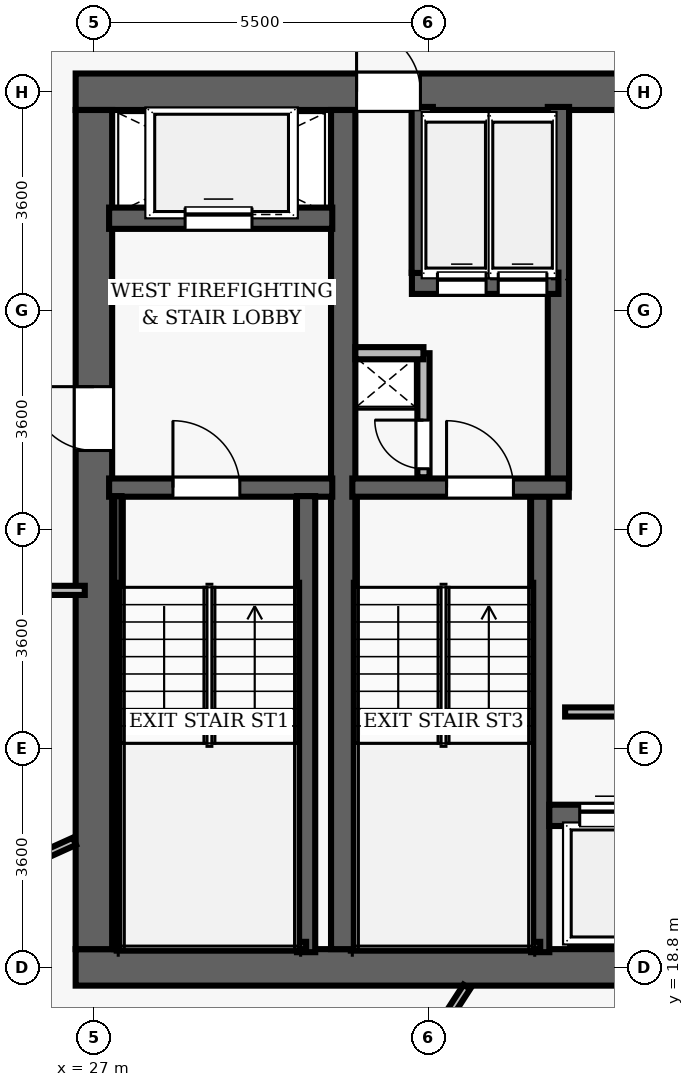
"""IFC4 building model, lengths in metres.
Left out: names, types, materials, properties, quantities, classifications, styles, units other than length and angle.
Written with IfcOpenShell. Run it as: python <this file> out.ifc"""

import sys

from ifc_helpers import new_model, si_unit, direction, frame, frame_2d, origin, place, context, subcontext, project, spatial, rectangle, extrude, element, fill, save


model = new_model("IFC4")
c1 = context("Model", 3, precision=1e-05, world=origin(), true_north=direction((0.0, 1.0)))
c2 = subcontext(c1, "Body", "Model", "MODEL_VIEW")
j1 = project(units=[si_unit("LENGTHUNIT", "METRE"), si_unit("PLANEANGLEUNIT", "RADIAN")], contexts=[c1])
p1 = place(None, origin())
s1 = spatial("IfcSite", under=j1, at=p1, CompositionType="ELEMENT")
p2 = place(p1, origin())
s2 = spatial("IfcBuilding", under=s1, at=p2, CompositionType="ELEMENT")
p3 = place(p2, frame((0.0, 0.0, 137.8)))
s3 = spatial("IfcBuildingStorey", under=s2, at=p3, CompositionType="ELEMENT", Elevation=137.8)
p4 = place(p3, frame((26.7, 18.8, 0.0), z_axis=(0.0, 0.0, 1.0), x_axis=(1.0, 0.0, 0.0)))
e1 = element("IfcWall", 1, at=p4, inside=s3, PredefinedType="SHEAR", context=c2, shape_type="SweptSolid", body=[
    extrude(rectangle(XDim=22.6, YDim=0.6, at=frame_2d((11.3, 0.0))), origin(), (0.0, 0.0, 1.0), 3.5),
])
p5 = place(p4, frame((14.52, 0.0, 0.0)))
e2 = element("IfcOpeningElement", 2, at=p5, cuts=e1, PredefinedType="OPENING", context=c2, shape_type="SweptSolid", body=[
    extrude(rectangle(XDim=1.05, YDim=2.15, at=frame_2d((0.525, 1.075))), frame((0.0, 0.31, 0.0), z_axis=(0.0, -1.0, 0.0), x_axis=(1.0, 0.0, 0.0)), (0.0, 0.0, 1.0), 0.62),
])
p6 = place(p3, frame((26.7, 33.2, 0.0), z_axis=(0.0, 0.0, 1.0), x_axis=(1.0, 0.0, 0.0)))
e3 = element("IfcWall", 3, at=p6, inside=s3, PredefinedType="SHEAR", context=c2, shape_type="SweptSolid", body=[
    extrude(rectangle(XDim=22.6, YDim=0.6, at=frame_2d((11.3, 0.0))), origin(), (0.0, 0.0, 1.0), 3.5),
])
p7 = place(p6, frame((4.62, 0.0, 0.0)))
e4 = element("IfcOpeningElement", 4, at=p7, cuts=e3, PredefinedType="OPENING", context=c2, shape_type="SweptSolid", body=[
    extrude(rectangle(XDim=1.05, YDim=2.15, at=frame_2d((0.525, 1.075))), frame((0.0, 0.31, 0.0), z_axis=(0.0, -1.0, 0.0), x_axis=(1.0, 0.0, 0.0)), (0.0, 0.0, 1.0), 0.62),
])
p8 = place(p6, frame((14.52, 0.0, 0.0)))
e5 = element("IfcOpeningElement", 5, at=p8, cuts=e3, PredefinedType="OPENING", context=c2, shape_type="SweptSolid", body=[
    extrude(rectangle(XDim=1.05, YDim=2.15, at=frame_2d((0.525, 1.075))), frame((0.0, 0.31, 0.0), z_axis=(0.0, -1.0, 0.0), x_axis=(1.0, 0.0, 0.0)), (0.0, 0.0, 1.0), 0.62),
])
p9 = place(p3, frame((27.0, 19.1, 0.0), z_axis=(0.0, 0.0, 1.0), x_axis=(0.0, 1.0, 0.0)))
e6 = element("IfcWall", 6, at=p9, inside=s3, PredefinedType="SHEAR", context=c2, shape_type="SweptSolid", body=[
    extrude(rectangle(XDim=13.8, YDim=0.6, at=frame_2d((6.9, 0.0))), origin(), (0.0, 0.0, 1.0), 3.5),
])
p10 = place(p9, frame((8.2, 0.0, 0.0)))
e7 = element("IfcOpeningElement", 7, at=p10, cuts=e6, PredefinedType="OPENING", context=c2, shape_type="SweptSolid", body=[
    extrude(rectangle(XDim=1.05, YDim=2.15, at=frame_2d((0.525, 1.075))), frame((0.0, 0.31, 0.0), z_axis=(0.0, -1.0, 0.0), x_axis=(1.0, 0.0, 0.0)), (0.0, 0.0, 1.0), 0.62),
])
p11 = place(p3, frame((31.1, 19.1, 0.0), z_axis=(0.0, 0.0, 1.0), x_axis=(0.0, 1.0, 0.0)))
e8 = element("IfcWall", 8, at=p11, inside=s3, PredefinedType="SHEAR", context=c2, shape_type="SweptSolid", body=[
    extrude(rectangle(XDim=13.8, YDim=0.4, at=frame_2d((6.9, 0.0))), origin(), (0.0, 0.0, 1.0), 3.5),
])
p12 = place(p3, frame((27.25, 26.69, 0.0), z_axis=(0.0, 0.0, 1.0), x_axis=(1.0, 0.0, 0.0)))
e9 = element("IfcWall", 9, at=p12, inside=s3, PredefinedType="SHEAR", context=c2, shape_type="SweptSolid", body=[
    extrude(rectangle(XDim=3.67, YDim=0.3, at=frame_2d((1.835, 0.0))), origin(), (0.0, 0.0, 1.0), 3.5),
])
p13 = place(p12, frame((1.05, 0.0, 0.0)))
e10 = element("IfcOpeningElement", 10, at=p13, cuts=e9, PredefinedType="OPENING", context=c2, shape_type="SweptSolid", body=[
    extrude(rectangle(XDim=1.1, YDim=2.15, at=frame_2d((0.55, 1.075))), frame((0.0, 0.16, 0.0), z_axis=(0.0, -1.0, 0.0), x_axis=(1.0, 0.0, 0.0)), (0.0, 0.0, 1.0), 0.32),
])
p14 = place(p3, frame((30.49, 19.05, 0.0), z_axis=(0.0, 0.0, 1.0), x_axis=(0.0, 1.0, 0.0)))
e11 = element("IfcWall", 11, at=p14, inside=s3, PredefinedType="SHEAR", context=c2, shape_type="SweptSolid", body=[
    extrude(rectangle(XDim=7.5, YDim=0.3, at=frame_2d((3.75, 0.0))), origin(), (0.0, 0.0, 1.0), 3.5),
])
p15 = place(p3, frame((27.395, 19.1, 0.0), z_axis=(0.0, 0.0, 1.0), x_axis=(0.0, 1.0, 0.0)))
e12 = element("IfcWall", 12, at=p15, inside=s3, PredefinedType="SHEAR", context=c2, shape_type="SweptSolid", body=[
    extrude(rectangle(XDim=7.45, YDim=0.12, at=frame_2d((3.725, 0.0))), origin(), (0.0, 0.0, 1.0), 3.5),
])
p16 = place(p3, frame((27.395, 19.16, 0.0), z_axis=(0.0, 0.0, 1.0), x_axis=(1.0, 0.0, 0.0)))
e13 = element("IfcWall", 13, at=p16, inside=s3, PredefinedType="SHEAR", context=c2, shape_type="SweptSolid", body=[
    extrude(rectangle(XDim=3.095, YDim=0.12, at=frame_2d((1.547, 0.0))), origin(), (0.0, 0.0, 1.0), 3.5),
])
p17 = place(p3, frame((27.25, 31.12, 0.0), z_axis=(0.0, 0.0, 1.0), x_axis=(1.0, 0.0, 0.0)))
e14 = element("IfcWall", 14, at=p17, inside=s3, PredefinedType="SHEAR", context=c2, shape_type="SweptSolid", body=[
    extrude(rectangle(XDim=3.67, YDim=0.35, at=frame_2d((1.835, 0.0))), origin(), (0.0, 0.0, 1.0), 2.675),
])
p18 = place(p17, frame((1.25, 0.0, 0.0)))
e15 = element("IfcOpeningElement", 15, at=p18, cuts=e14, PredefinedType="OPENING", context=c2, shape_type="SweptSolid", body=[
    extrude(rectangle(XDim=1.1, YDim=2.15, at=frame_2d((0.55, 1.075))), frame((0.0, 0.185, 0.0), z_axis=(0.0, -1.0, 0.0), x_axis=(1.0, 0.0, 0.0)), (0.0, 0.0, 1.0), 0.37),
])
p19 = place(p3, frame((34.34, 19.05, 0.0), z_axis=(0.0, 0.0, 1.0), x_axis=(0.0, 1.0, 0.0)))
e16 = element("IfcWall", 16, at=p19, inside=s3, PredefinedType="SHEAR", context=c2, shape_type="SweptSolid", body=[
    extrude(rectangle(XDim=7.5, YDim=0.3, at=frame_2d((3.75, 0.0))), origin(), (0.0, 0.0, 1.0), 3.5),
])
p20 = place(p3, frame((34.64, 26.69, 0.0), z_axis=(0.0, 0.0, 1.0), x_axis=(0.0, 1.0, 0.0)))
e17 = element("IfcWall", 17, at=p20, inside=s3, PredefinedType="SHEAR", context=c2, shape_type="SweptSolid", body=[
    extrude(rectangle(XDim=6.26, YDim=0.35, at=frame_2d((3.13, 0.0))), origin(), (0.0, 0.0, 1.0), 3.5),
])
p21 = place(p3, frame((31.25, 26.69, 0.0), z_axis=(0.0, 0.0, 1.0), x_axis=(1.0, 0.0, 0.0)))
e18 = element("IfcWall", 18, at=p21, inside=s3, PredefinedType="SHEAR", context=c2, shape_type="SweptSolid", body=[
    extrude(rectangle(XDim=3.56, YDim=0.3, at=frame_2d((1.78, 0.0))), origin(), (0.0, 0.0, 1.0), 3.5),
])
p22 = place(p21, frame((1.55, 0.0, 0.0)))
e19 = element("IfcOpeningElement", 19, at=p22, cuts=e18, PredefinedType="OPENING", context=c2, shape_type="SweptSolid", body=[
    extrude(rectangle(XDim=1.1, YDim=2.15, at=frame_2d((0.55, 1.075))), frame((0.0, 0.16, 0.0), z_axis=(0.0, -1.0, 0.0), x_axis=(1.0, 0.0, 0.0)), (0.0, 0.0, 1.0), 0.32),
])
p23 = place(p3, frame((31.3, 19.16, 0.0), z_axis=(0.0, 0.0, 1.0), x_axis=(1.0, 0.0, 0.0)))
e20 = element("IfcWall", 20, at=p23, inside=s3, PredefinedType="SHEAR", context=c2, shape_type="SweptSolid", body=[
    extrude(rectangle(XDim=3.04, YDim=0.12, at=frame_2d((1.52, 0.0))), origin(), (0.0, 0.0, 1.0), 3.5),
])
p24 = place(p3, frame((32.23, 30.05, 0.0), z_axis=(0.0, 0.0, 1.0), x_axis=(1.0, 0.0, 0.0)))
e21 = element("IfcWall", 21, at=p24, inside=s3, PredefinedType="SHEAR", context=c2, shape_type="SweptSolid", body=[
    extrude(rectangle(XDim=2.41, YDim=0.35, at=frame_2d((1.205, 0.0))), origin(), (0.0, 0.0, 1.0), 2.675),
])
p25 = place(p24, frame((0.42, 0.0, 0.0)))
e22 = element("IfcOpeningElement", 22, at=p25, cuts=e21, PredefinedType="OPENING", context=c2, shape_type="SweptSolid", body=[
    extrude(rectangle(XDim=0.8, YDim=2.15, at=frame_2d((0.4, 1.075))), frame((0.0, 0.185, 0.0), z_axis=(0.0, -1.0, 0.0), x_axis=(1.0, 0.0, 0.0)), (0.0, 0.0, 1.0), 0.37),
])
p26 = place(p24, frame((1.42, 0.0, 0.0)))
e23 = element("IfcOpeningElement", 23, at=p26, cuts=e21, PredefinedType="OPENING", context=c2, shape_type="SweptSolid", body=[
    extrude(rectangle(XDim=0.8, YDim=2.15, at=frame_2d((0.4, 1.075))), frame((0.0, 0.185, 0.0), z_axis=(0.0, -1.0, 0.0), x_axis=(1.0, 0.0, 0.0)), (0.0, 0.0, 1.0), 0.37),
])
p27 = place(p3, frame((32.4, 30.22, 0.0), z_axis=(0.0, 0.0, 1.0), x_axis=(0.0, 1.0, 0.0)))
e24 = element("IfcWall", 24, at=p27, inside=s3, PredefinedType="SHEAR", context=c2, shape_type="SweptSolid", body=[
    extrude(rectangle(XDim=2.73, YDim=0.35, at=frame_2d((1.365, 0.0))), origin(), (0.0, 0.0, 1.0), 2.675),
])
p28 = place(p3, frame((32.42, 26.86, 0.0), z_axis=(0.0, 0.0, 1.0), x_axis=(0.0, 1.0, 0.0)))
e25 = element("IfcWall", 25, at=p28, inside=s3, PredefinedType="PARTITIONING", context=c2, shape_type="SweptSolid", body=[
    extrude(rectangle(XDim=2.04, YDim=0.2, at=frame_2d((1.02, 0.0))), origin(), (0.0, 0.0, 1.0), 2.675),
])
p29 = place(p28, frame((0.14, 0.0, 0.0)))
e26 = element("IfcOpeningElement", 26, at=p29, cuts=e25, PredefinedType="OPENING", context=c2, shape_type="SweptSolid", body=[
    extrude(rectangle(XDim=0.8, YDim=2.05, at=frame_2d((0.4, 1.025))), frame((0.0, 0.11, 0.0), z_axis=(0.0, -1.0, 0.0), x_axis=(1.0, 0.0, 0.0)), (0.0, 0.0, 1.0), 0.22),
])
p30 = place(p3, frame((31.3, 28.9, 0.0), z_axis=(0.0, 0.0, 1.0), x_axis=(1.0, 0.0, 0.0)))
e27 = element("IfcWall", 27, at=p30, inside=s3, PredefinedType="PARTITIONING", context=c2, shape_type="SweptSolid", body=[
    extrude(rectangle(XDim=1.12, YDim=0.2, at=frame_2d((0.56, 0.0))), origin(), (0.0, 0.0, 1.0), 2.675),
])
p31 = place(p3, frame((34.49, 21.3, 0.0), z_axis=(0.0, 0.0, 1.0), x_axis=(1.0, 0.0, 0.0)))
e28 = element("IfcWall", 28, at=p31, inside=s3, PredefinedType="SHEAR", context=c2, shape_type="SweptSolid", body=[
    extrude(rectangle(XDim=6.68, YDim=0.35, at=frame_2d((3.34, 0.0))), origin(), (0.0, 0.0, 1.0), 2.675),
])
p32 = place(p31, frame((0.5, 0.0, 0.0)))
e29 = element("IfcOpeningElement", 29, at=p32, cuts=e28, PredefinedType="OPENING", context=c2, shape_type="SweptSolid", body=[
    extrude(rectangle(XDim=0.9, YDim=2.15, at=frame_2d((0.45, 1.075))), frame((0.0, 0.185, 0.0), z_axis=(0.0, -1.0, 0.0), x_axis=(1.0, 0.0, 0.0)), (0.0, 0.0, 1.0), 0.37),
])
p33 = place(p31, frame((2.58, 0.0, 0.0)))
e30 = element("IfcOpeningElement", 30, at=p33, cuts=e28, PredefinedType="OPENING", context=c2, shape_type="SweptSolid", body=[
    extrude(rectangle(XDim=0.9, YDim=2.15, at=frame_2d((0.45, 1.075))), frame((0.0, 0.185, 0.0), z_axis=(0.0, -1.0, 0.0), x_axis=(1.0, 0.0, 0.0)), (0.0, 0.0, 1.0), 0.37),
])
p34 = place(p31, frame((4.66, 0.0, 0.0)))
e31 = element("IfcOpeningElement", 31, at=p34, cuts=e28, PredefinedType="OPENING", context=c2, shape_type="SweptSolid", body=[
    extrude(rectangle(XDim=0.9, YDim=2.15, at=frame_2d((0.45, 1.075))), frame((0.0, 0.185, 0.0), z_axis=(0.0, -1.0, 0.0), x_axis=(1.0, 0.0, 0.0)), (0.0, 0.0, 1.0), 0.37),
])
p35 = place(p3, frame((34.75, 23.0, 0.0), z_axis=(0.0, 0.0, 1.0), x_axis=(1.0, 0.0, 0.0)))
e32 = element("IfcWall", 32, at=p35, inside=s3, PredefinedType="PARTITIONING", context=c2, shape_type="SweptSolid", body=[
    extrude(rectangle(XDim=6.25, YDim=0.15, at=frame_2d((3.125, 0.0))), origin(), (0.0, 0.0, 1.0), 2.675),
])
p36 = place(p3, frame((14.5, 25.0, 0.0), z_axis=(0.0, 0.0, 1.0), x_axis=(1.0, 0.0, 0.0)))
e33 = element("IfcWall", 33, at=p36, inside=s3, PredefinedType="PARTITIONING", context=c2, shape_type="SweptSolid", body=[
    extrude(rectangle(XDim=12.35, YDim=0.15, at=frame_2d((6.175, 0.0))), origin(), (0.0, 0.0, 1.0), 2.675),
])
p37 = place(p36, frame((8.788, 0.0, 0.0)))
e34 = element("IfcOpeningElement", 34, at=p37, cuts=e33, PredefinedType="OPENING", context=c2, shape_type="SweptSolid", body=[
    extrude(rectangle(XDim=0.95, YDim=2.15, at=frame_2d((0.475, 1.075))), frame((0.0, 0.085, 0.0), z_axis=(0.0, -1.0, 0.0), x_axis=(1.0, 0.0, 0.0)), (0.0, 0.0, 1.0), 0.17),
])
p38 = place(p3, frame((26.68, 20.874, 0.0), z_axis=(0.0, 0.0, 1.0), x_axis=(-0.910944929942, -0.4125279804, 0.0)))
e35 = element("IfcWall", 35, at=p38, inside=s3, PredefinedType="PARTITIONING", context=c2, shape_type="SweptSolid", body=[
    extrude(rectangle(XDim=11.228, YDim=0.13, at=frame_2d((5.614, 0.0))), origin(), (0.0, 0.0, 1.0), 2.675),
])
p39 = place(p3, frame((33.133, 18.48, 0.0), z_axis=(0.0, 0.0, 1.0), x_axis=(-0.543304894445, -0.839535461831, 0.0)))
e36 = element("IfcWall", 36, at=p39, inside=s3, PredefinedType="PARTITIONING", context=c2, shape_type="SweptSolid", body=[
    extrude(rectangle(XDim=13.971, YDim=0.13, at=frame_2d((6.986, 0.0))), origin(), (0.0, 0.0, 1.0), 2.675),
])
p40 = place(p13, origin())
e37 = element("IfcDoor", 37, at=p40, inside=s3, OperationType="SINGLE_SWING_LEFT", PredefinedType="DOOR", context=c2, shape_type="SweptSolid", body=[
    extrude(rectangle(XDim=1.1, YDim=2.15, at=frame_2d((0.55, 1.075))), frame((0.0, 0.025, 0.0), z_axis=(0.0, -1.0, 0.0), x_axis=(1.0, 0.0, 0.0)), (0.0, 0.0, 1.0), 0.05),
])
fill(e10, e37)
p41 = place(p10, origin())
e38 = element("IfcDoor", 38, at=p41, inside=s3, OperationType="SINGLE_SWING_RIGHT", PredefinedType="DOOR", context=c2, shape_type="SweptSolid", body=[
    extrude(rectangle(XDim=1.05, YDim=2.15, at=frame_2d((0.525, 1.075))), frame((0.0, 0.025, 0.0), z_axis=(0.0, -1.0, 0.0), x_axis=(1.0, 0.0, 0.0)), (0.0, 0.0, 1.0), 0.05),
])
fill(e7, e38)
p42 = place(p22, origin())
e39 = element("IfcDoor", 39, at=p42, inside=s3, OperationType="SINGLE_SWING_LEFT", PredefinedType="DOOR", context=c2, shape_type="SweptSolid", body=[
    extrude(rectangle(XDim=1.1, YDim=2.15, at=frame_2d((0.55, 1.075))), frame((0.0, 0.025, 0.0), z_axis=(0.0, -1.0, 0.0), x_axis=(1.0, 0.0, 0.0)), (0.0, 0.0, 1.0), 0.05),
])
fill(e19, e39)
p43 = place(p29, origin())
e40 = element("IfcDoor", 40, at=p43, inside=s3, OperationType="SINGLE_SWING_RIGHT", PredefinedType="DOOR", context=c2, shape_type="SweptSolid", body=[
    extrude(rectangle(XDim=0.8, YDim=2.05, at=frame_2d((0.4, 1.025))), frame((0.0, 0.025, 0.0), z_axis=(0.0, -1.0, 0.0), x_axis=(1.0, 0.0, 0.0)), (0.0, 0.0, 1.0), 0.05),
])
fill(e26, e40)
p44 = place(p7, origin())
e41 = element("IfcDoor", 41, at=p44, inside=s3, OperationType="SINGLE_SWING_LEFT", PredefinedType="DOOR", context=c2, shape_type="SweptSolid", body=[
    extrude(rectangle(XDim=1.05, YDim=2.15, at=frame_2d((0.525, 1.075))), frame((0.0, 0.025, 0.0), z_axis=(0.0, -1.0, 0.0), x_axis=(1.0, 0.0, 0.0)), (0.0, 0.0, 1.0), 0.05),
])
fill(e4, e41)
p45 = place(p32, origin())
e42 = element("IfcDoor", 42, at=p45, inside=s3, OperationType="SLIDING_TO_LEFT", PredefinedType="DOOR", context=c2, shape_type="SweptSolid", body=[
    extrude(rectangle(XDim=0.9, YDim=2.15, at=frame_2d((0.45, 1.075))), frame((0.0, 0.025, 0.0), z_axis=(0.0, -1.0, 0.0), x_axis=(1.0, 0.0, 0.0)), (0.0, 0.0, 1.0), 0.05),
])
fill(e29, e42)
p46 = place(p18, origin())
e43 = element("IfcDoor", 43, at=p46, inside=s3, OperationType="SLIDING_TO_LEFT", PredefinedType="DOOR", context=c2, shape_type="SweptSolid", body=[
    extrude(rectangle(XDim=1.1, YDim=2.15, at=frame_2d((0.55, 1.075))), frame((0.0, 0.025, 0.0), z_axis=(0.0, -1.0, 0.0), x_axis=(1.0, 0.0, 0.0)), (0.0, 0.0, 1.0), 0.05),
])
fill(e15, e43)
p47 = place(p25, origin())
e44 = element("IfcDoor", 44, at=p47, inside=s3, OperationType="SLIDING_TO_LEFT", PredefinedType="DOOR", context=c2, shape_type="SweptSolid", body=[
    extrude(rectangle(XDim=0.8, YDim=2.15, at=frame_2d((0.4, 1.075))), frame((0.0, 0.025, 0.0), z_axis=(0.0, -1.0, 0.0), x_axis=(1.0, 0.0, 0.0)), (0.0, 0.0, 1.0), 0.05),
])
fill(e22, e44)
p48 = place(p26, origin())
e45 = element("IfcDoor", 45, at=p48, inside=s3, OperationType="SLIDING_TO_LEFT", PredefinedType="DOOR", context=c2, shape_type="SweptSolid", body=[
    extrude(rectangle(XDim=0.8, YDim=2.15, at=frame_2d((0.4, 1.075))), frame((0.0, 0.025, 0.0), z_axis=(0.0, -1.0, 0.0), x_axis=(1.0, 0.0, 0.0)), (0.0, 0.0, 1.0), 0.05),
])
fill(e23, e45)
save(model, sys.argv[1])
